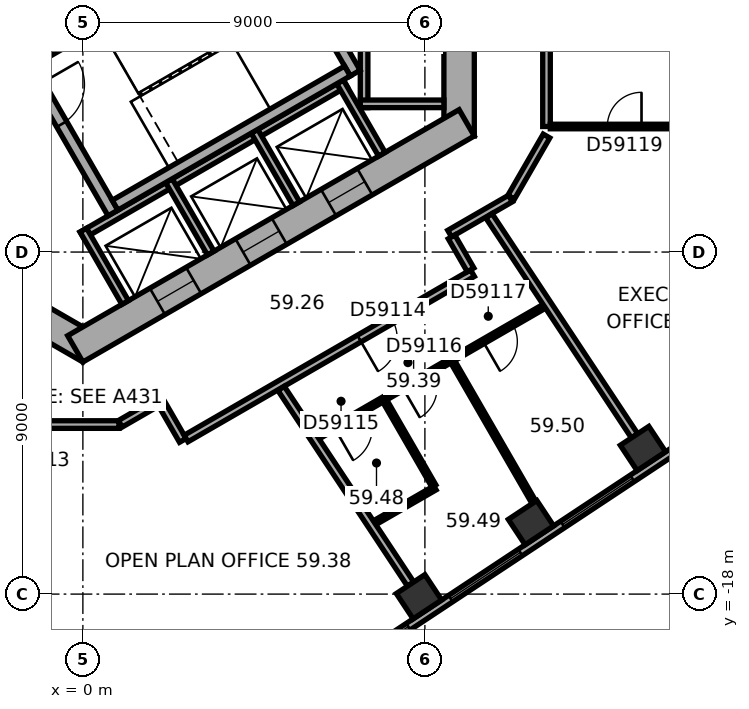
"""IFC4 building model, lengths in metres.
Left out: names, types, materials, properties, quantities, classifications, styles, units other than length and angle.
Written with IfcOpenShell. Run it as: python <this file> out.ifc"""

import sys

from ifc_helpers import new_model, si_unit, direction, frame, frame_2d, origin, origin_2d, place, context, subcontext, project, spatial, rectangle, extrude, element, fill, save


model = new_model("IFC4")
c1 = context("Model", 3, precision=1e-05, world=origin(), true_north=direction((0.0, 1.0)))
c2 = subcontext(c1, "Body", "Model", "MODEL_VIEW")
j1 = project(units=[si_unit("LENGTHUNIT", "METRE"), si_unit("PLANEANGLEUNIT", "RADIAN")], contexts=[c1])
p1 = place(None, origin())
s1 = spatial("IfcSite", under=j1, at=p1, CompositionType="ELEMENT")
p2 = place(p1, origin())
s2 = spatial("IfcBuilding", under=s1, at=p2, CompositionType="ELEMENT")
p3 = place(p2, frame((0.0, 0.0, 240.2)))
s3 = spatial("IfcBuildingStorey", under=s2, at=p3, CompositionType="ELEMENT", Elevation=240.2)
for number, where, z_axis, x_axis in (
    (1, (8.844, -18.07, 0.0), (0.0, 0.0, 1.0), (0.834, 0.552, 0.0)),
    (2, (11.791, -16.12, 0.0), (0.0, 0.0, 1.0), (0.834, 0.552, 0.0)),
    (3, (14.738, -14.169, 0.0), (0.0, 0.0, 1.0), (0.834, 0.552, 0.0)),
):
    element("IfcColumn", number, at=place(p3, frame(where, z_axis=z_axis, x_axis=x_axis)), inside=s3, PredefinedType="COLUMN", context=c2, shape_type="SweptSolid", body=[
        extrude(rectangle(XDim=0.9, YDim=0.8, at=origin_2d()), origin(), (0.0, 0.0, 1.0), 3.7),
    ])
p4 = place(p3, frame((9.9, -5.947, 0.0), z_axis=(0.0, 0.0, 1.0), x_axis=(0.0, 1.0, 0.0)))
e4 = element("IfcWall", 4, at=p4, inside=s3, PredefinedType="SHEAR", context=c2, shape_type="SweptSolid", body=[
    extrude(rectangle(XDim=11.894, YDim=0.8, at=frame_2d((5.947, 0.0))), origin(), (0.0, 0.0, 1.0), 3.7),
])
p5 = place(p4, frame((6.147, 0.0, 0.0)))
e5 = element("IfcOpeningElement", 5, at=p5, cuts=e4, PredefinedType="OPENING", context=c2, shape_type="SweptSolid", body=[
    extrude(rectangle(XDim=1.5, YDim=2.1, at=frame_2d((0.75, 1.05))), frame((0.0, 0.41, 0.0), z_axis=(0.0, -1.0, 0.0), x_axis=(1.0, 0.0, 0.0)), (0.0, 0.0, 1.0), 0.82),
])
p6 = place(p4, frame((2.997, 0.0, 0.0)))
e6 = element("IfcOpeningElement", 6, at=p6, cuts=e4, PredefinedType="OPENING", context=c2, shape_type="SweptSolid", body=[
    extrude(rectangle(XDim=0.9, YDim=2.1, at=frame_2d((0.45, 1.05))), frame((0.0, 0.41, 0.0), z_axis=(0.0, -1.0, 0.0), x_axis=(1.0, 0.0, 0.0)), (0.0, 0.0, 1.0), 0.82),
])
p7 = place(p3, frame((-10.1, -5.6, 0.0), z_axis=(0.0, 0.0, 1.0), x_axis=(0.866023897231, -0.500002609418, 0.0)))
e7 = element("IfcWall", 7, at=p7, inside=s3, PredefinedType="SHEAR", context=c2, shape_type="SweptSolid", body=[
    extrude(rectangle(XDim=11.894, YDim=0.8, at=frame_2d((5.947, 0.0))), origin(), (0.0, 0.0, 1.0), 3.7),
])
p8 = place(p7, frame((6.147, 0.0, 0.0)))
e8 = element("IfcOpeningElement", 8, at=p8, cuts=e7, PredefinedType="OPENING", context=c2, shape_type="SweptSolid", body=[
    extrude(rectangle(XDim=1.5, YDim=2.1, at=frame_2d((0.75, 1.05))), frame((0.0, 0.41, 0.0), z_axis=(0.0, -1.0, 0.0), x_axis=(1.0, 0.0, 0.0)), (0.0, 0.0, 1.0), 0.82),
])
p9 = place(p7, frame((1.597, 0.0, 0.0)))
e9 = element("IfcOpeningElement", 9, at=p9, cuts=e7, PredefinedType="OPENING", context=c2, shape_type="SweptSolid", body=[
    extrude(rectangle(XDim=1.1, YDim=2.1, at=frame_2d((0.55, 1.05))), frame((0.0, 0.41, 0.0), z_axis=(0.0, -1.0, 0.0), x_axis=(1.0, 0.0, 0.0)), (0.0, 0.0, 1.0), 0.82),
])
p10 = place(p7, frame((4.197, 0.0, 0.0)))
e10 = element("IfcOpeningElement", 10, at=p10, cuts=e7, PredefinedType="OPENING", context=c2, shape_type="SweptSolid", body=[
    extrude(rectangle(XDim=1.1, YDim=2.1, at=frame_2d((0.55, 1.05))), frame((0.0, 0.41, 0.0), z_axis=(0.0, -1.0, 0.0), x_axis=(1.0, 0.0, 0.0)), (0.0, 0.0, 1.0), 0.82),
])
p11 = place(p3, frame((-0.2, -11.547, 0.0), z_axis=(0.0, 0.0, 1.0), x_axis=(0.866023897231, 0.500002609418, 0.0)))
e11 = element("IfcWall", 11, at=p11, inside=s3, PredefinedType="SHEAR", context=c2, shape_type="SweptSolid", body=[
    extrude(rectangle(XDim=11.894, YDim=0.8, at=frame_2d((5.947, 0.0))), origin(), (0.0, 0.0, 1.0), 3.7),
])
p12 = place(p11, frame((2.497, 0.0, 0.0)))
e12 = element("IfcOpeningElement", 12, at=p12, cuts=e11, PredefinedType="OPENING", context=c2, shape_type="SweptSolid", body=[
    extrude(rectangle(XDim=1.1, YDim=2.1, at=frame_2d((0.55, 1.05))), frame((0.0, 0.41, 0.0), z_axis=(0.0, -1.0, 0.0), x_axis=(1.0, 0.0, 0.0)), (0.0, 0.0, 1.0), 0.82),
])
p13 = place(p11, frame((5.097, 0.0, 0.0)))
e13 = element("IfcOpeningElement", 13, at=p13, cuts=e11, PredefinedType="OPENING", context=c2, shape_type="SweptSolid", body=[
    extrude(rectangle(XDim=1.1, YDim=2.1, at=frame_2d((0.55, 1.05))), frame((0.0, 0.41, 0.0), z_axis=(0.0, -1.0, 0.0), x_axis=(1.0, 0.0, 0.0)), (0.0, 0.0, 1.0), 0.82),
])
p14 = place(p11, frame((7.697, 0.0, 0.0)))
e14 = element("IfcOpeningElement", 14, at=p14, cuts=e11, PredefinedType="OPENING", context=c2, shape_type="SweptSolid", body=[
    extrude(rectangle(XDim=1.1, YDim=2.1, at=frame_2d((0.55, 1.05))), frame((0.0, 0.41, 0.0), z_axis=(0.0, -1.0, 0.0), x_axis=(1.0, 0.0, 0.0)), (0.0, 0.0, 1.0), 0.82),
])
p15 = place(p3, frame((2.739, -22.711, 0.0), z_axis=(0.0, 0.0, 1.0), x_axis=(0.833885723098, 0.551937134838, 0.0)))
e15 = element("IfcWall", 15, at=p15, inside=s3, PredefinedType="STANDARD", context=c2, shape_type="SweptSolid", body=[
    extrude(rectangle(XDim=18.841, YDim=0.2, at=frame_2d((9.421, 0.0))), origin(), (0.0, 0.0, 1.0), 3.7),
])
p16 = place(p15, frame((1.252, 0.0, 0.9)))
e16 = element("IfcOpeningElement", 16, at=p16, cuts=e15, PredefinedType="OPENING", context=c2, shape_type="SweptSolid", body=[
    extrude(rectangle(XDim=2.2, YDim=2.0, at=frame_2d((1.1, 1.0))), frame((0.0, 0.11, 0.0), z_axis=(0.0, -1.0, 0.0), x_axis=(1.0, 0.0, 0.0)), (0.0, 0.0, 1.0), 0.22),
])
p17 = place(p15, frame((4.786, 0.0, 0.9)))
e17 = element("IfcOpeningElement", 17, at=p17, cuts=e15, PredefinedType="OPENING", context=c2, shape_type="SweptSolid", body=[
    extrude(rectangle(XDim=2.2, YDim=2.0, at=frame_2d((1.1, 1.0))), frame((0.0, 0.11, 0.0), z_axis=(0.0, -1.0, 0.0), x_axis=(1.0, 0.0, 0.0)), (0.0, 0.0, 1.0), 0.22),
])
p18 = place(p15, frame((8.32, 0.0, 0.9)))
e18 = element("IfcOpeningElement", 18, at=p18, cuts=e15, PredefinedType="OPENING", context=c2, shape_type="SweptSolid", body=[
    extrude(rectangle(XDim=2.2, YDim=2.0, at=frame_2d((1.1, 1.0))), frame((0.0, 0.11, 0.0), z_axis=(0.0, -1.0, 0.0), x_axis=(1.0, 0.0, 0.0)), (0.0, 0.0, 1.0), 0.22),
])
p19 = place(p15, frame((11.854, 0.0, 0.9)))
e19 = element("IfcOpeningElement", 19, at=p19, cuts=e15, PredefinedType="OPENING", context=c2, shape_type="SweptSolid", body=[
    extrude(rectangle(XDim=2.2, YDim=2.0, at=frame_2d((1.1, 1.0))), frame((0.0, 0.11, 0.0), z_axis=(0.0, -1.0, 0.0), x_axis=(1.0, 0.0, 0.0)), (0.0, 0.0, 1.0), 0.22),
])
p20 = place(p15, frame((15.387, 0.0, 0.9)))
e20 = element("IfcOpeningElement", 20, at=p20, cuts=e15, PredefinedType="OPENING", context=c2, shape_type="SweptSolid", body=[
    extrude(rectangle(XDim=2.2, YDim=2.0, at=frame_2d((1.1, 1.0))), frame((0.0, 0.11, 0.0), z_axis=(0.0, -1.0, 0.0), x_axis=(1.0, 0.0, 0.0)), (0.0, 0.0, 1.0), 0.22),
])
p21 = place(p3, frame((7.4, -5.2, 0.0), z_axis=(0.0, 0.0, 1.0), x_axis=(0.0, 1.0, 0.0)))
e21 = element("IfcWall", 21, at=p21, inside=s3, PredefinedType="PARTITIONING", context=c2, shape_type="SweptSolid", body=[
    extrude(rectangle(XDim=5.4, YDim=0.2, at=frame_2d((2.7, 0.0))), origin(), (0.0, 0.0, 1.0), 3.42),
])
p22 = place(p3, frame((7.3, -5.1, 0.0), z_axis=(0.0, 0.0, 1.0), x_axis=(1.0, 0.0, 0.0)))
e22 = element("IfcWall", 22, at=p22, inside=s3, PredefinedType="PARTITIONING", context=c2, shape_type="SweptSolid", body=[
    extrude(rectangle(XDim=2.2, YDim=0.2, at=frame_2d((1.1, 0.0))), origin(), (0.0, 0.0, 1.0), 3.42),
])
p23 = place(p3, frame((-0.024, -8.559, 0.0), z_axis=(0.0, 0.0, 1.0), x_axis=(0.866026010844, 0.49999894854, 0.0)))
e23 = element("IfcWall", 23, at=p23, inside=s3, PredefinedType="PARTITIONING", context=c2, shape_type="SweptSolid", body=[
    extrude(rectangle(XDim=8.0, YDim=0.2, at=frame_2d((4.0, 0.0))), origin(), (0.0, 0.0, 1.0), 3.42),
])
for number, where, z_axis, x_axis in (
    (24, (0.013, -8.422, 0.0), (0.0, 0.0, 1.0), (0.5, -0.866, 0.0)),
    (25, (2.264, -7.122, 0.0), (0.0, 0.0, 1.0), (0.5, -0.866, 0.0)),
    (26, (4.516, -5.822, 0.0), (0.0, 0.0, 1.0), (0.5, -0.866, 0.0)),
    (27, (6.768, -4.522, 0.0), (0.0, 0.0, 1.0), (0.5, -0.866, 0.0)),
):
    element("IfcWall", number, at=place(p3, frame(where, z_axis=z_axis, x_axis=x_axis)), inside=s3, PredefinedType="PARTITIONING", context=c2, shape_type="SweptSolid", body=[
        extrude(rectangle(XDim=2.2, YDim=0.2, at=frame_2d((1.1, 0.0))), origin(), (0.0, 0.0, 1.0), 3.42),
    ])
p24 = place(p3, frame((-1.558, -3.902, 0.0), z_axis=(0.0, 0.0, 1.0), x_axis=(0.499977259774, -0.866038532462, 0.0)))
e28 = element("IfcWall", 28, at=p24, inside=s3, PredefinedType="SHEAR", context=c2, shape_type="SweptSolid", body=[
    extrude(rectangle(XDim=4.7, YDim=0.3, at=frame_2d((2.35, 0.0))), origin(), (0.0, 0.0, 1.0), 3.42),
])
p25 = place(p24, frame((0.8, 0.0, 0.0)))
e29 = element("IfcOpeningElement", 29, at=p25, cuts=e28, PredefinedType="OPENING", context=c2, shape_type="SweptSolid", body=[
    extrude(rectangle(XDim=1.2, YDim=2.1, at=frame_2d((0.6, 1.05))), frame((0.0, 0.16, 0.0), z_axis=(0.0, -1.0, 0.0), x_axis=(1.0, 0.0, 0.0)), (0.0, 0.0, 1.0), 0.32),
])
p26 = place(p3, frame((4.816, -0.222, 0.0), z_axis=(0.0, 0.0, 1.0), x_axis=(0.499977259774, -0.866038532462, 0.0)))
e30 = element("IfcWall", 30, at=p26, inside=s3, PredefinedType="SHEAR", context=c2, shape_type="SweptSolid", body=[
    extrude(rectangle(XDim=4.7, YDim=0.3, at=frame_2d((2.35, 0.0))), origin(), (0.0, 0.0, 1.0), 3.42),
])
for number, where, z_axis, x_axis in (
    (31, (-1.353, -3.957, 0.0), (0.0, 0.0, 1.0), (0.866, 0.5, 0.0)),
    (32, (0.847, -7.767, 0.0), (0.0, 0.0, 1.0), (0.866, 0.5, 0.0)),
):
    element("IfcWall", number, at=place(p3, frame(where, z_axis=z_axis, x_axis=x_axis)), inside=s3, PredefinedType="SHEAR", context=c2, shape_type="SweptSolid", body=[
        extrude(rectangle(XDim=7.06, YDim=0.3, at=frame_2d((3.53, 0.0))), origin(), (0.0, 0.0, 1.0), 3.42),
    ])
p27 = place(p3, frame((-0.91, -13.539, 0.0), z_axis=(0.0, 0.0, 1.0), x_axis=(1.0, 0.0, 0.0)))
e33 = element("IfcWall", 33, at=p27, inside=s3, PredefinedType="PARTITIONING", context=c2, shape_type="SweptSolid", body=[
    extrude(rectangle(XDim=1.86, YDim=0.2, at=frame_2d((0.93, 0.0))), origin(), (0.0, 0.0, 1.0), 3.42),
])
p28 = place(p3, frame((0.985, -13.519, 0.0), z_axis=(0.0, 0.0, 1.0), x_axis=(0.866054082991, 0.499950322867, 0.0)))
e34 = element("IfcWall", 34, at=p28, inside=s3, PredefinedType="PARTITIONING", context=c2, shape_type="SweptSolid", body=[
    extrude(rectangle(XDim=1.206, YDim=0.2, at=frame_2d((0.603, 0.0))), origin(), (0.0, 0.0, 1.0), 3.42),
])
p29 = place(p3, frame((2.079, -13.003, 0.0), z_axis=(0.0, 0.0, 1.0), x_axis=(0.500074377092, -0.865982457891, 0.0)))
e35 = element("IfcWall", 35, at=p29, inside=s3, PredefinedType="PARTITIONING", context=c2, shape_type="SweptSolid", body=[
    extrude(rectangle(XDim=1.101, YDim=0.2, at=frame_2d((0.55, 0.0))), origin(), (0.0, 0.0, 1.0), 3.42),
])
p30 = place(p3, frame((2.716, -13.906, 0.0), z_axis=(0.0, 0.0, 1.0), x_axis=(0.866040290674, 0.499974214264, 0.0)))
e36 = element("IfcWall", 36, at=p30, inside=s3, PredefinedType="PARTITIONING", context=c2, shape_type="SweptSolid", body=[
    extrude(rectangle(XDim=8.702, YDim=0.2, at=frame_2d((4.351, 0.0))), origin(), (0.0, 0.0, 1.0), 3.42),
])
p31 = place(p30, frame((5.26, 0.0, 0.0)))
e37 = element("IfcOpeningElement", 37, at=p31, cuts=e36, PredefinedType="OPENING", context=c2, shape_type="SweptSolid", body=[
    extrude(rectangle(XDim=1.0, YDim=2.1, at=frame_2d((0.5, 1.05))), frame((0.0, 0.11, 0.0), z_axis=(0.0, -1.0, 0.0), x_axis=(1.0, 0.0, 0.0)), (0.0, 0.0, 1.0), 0.22),
])
p32 = place(p3, frame((6.183, -13.867, 0.0), z_axis=(0.0, 0.0, 1.0), x_axis=(0.866031365477, 0.499989673903, 0.0)))
e38 = element("IfcWall", 38, at=p32, inside=s3, PredefinedType="PARTITIONING", context=c2, shape_type="SweptSolid", body=[
    extrude(rectangle(XDim=6.881, YDim=0.12, at=frame_2d((3.44, 0.0))), origin(), (0.0, 0.0, 1.0), 3.42),
])
p33 = place(p32, frame((0.5, 0.0, 0.0)))
e39 = element("IfcOpeningElement", 39, at=p33, cuts=e38, PredefinedType="OPENING", context=c2, shape_type="SweptSolid", body=[
    extrude(rectangle(XDim=1.0, YDim=2.1, at=frame_2d((0.5, 1.05))), frame((0.0, 0.07, 0.0), z_axis=(0.0, -1.0, 0.0), x_axis=(1.0, 0.0, 0.0)), (0.0, 0.0, 1.0), 0.14),
])
p34 = place(p32, frame((2.583, 0.0, 0.0)))
e40 = element("IfcOpeningElement", 40, at=p34, cuts=e38, PredefinedType="OPENING", context=c2, shape_type="SweptSolid", body=[
    extrude(rectangle(XDim=0.9, YDim=2.1, at=frame_2d((0.45, 1.05))), frame((0.0, 0.07, 0.0), z_axis=(0.0, -1.0, 0.0), x_axis=(1.0, 0.0, 0.0)), (0.0, 0.0, 1.0), 0.14),
])
p35 = place(p32, frame((5.023, 0.0, 0.0)))
e41 = element("IfcOpeningElement", 41, at=p35, cuts=e38, PredefinedType="OPENING", context=c2, shape_type="SweptSolid", body=[
    extrude(rectangle(XDim=0.9, YDim=2.1, at=frame_2d((0.45, 1.05))), frame((0.0, 0.07, 0.0), z_axis=(0.0, -1.0, 0.0), x_axis=(1.0, 0.0, 0.0)), (0.0, 0.0, 1.0), 0.14),
])
p36 = place(p3, frame((7.676, -16.123, 0.0), z_axis=(0.0, 0.0, 1.0), x_axis=(0.866023842607, 0.500002704028, 0.0)))
e42 = element("IfcWall", 42, at=p36, inside=s3, PredefinedType="PARTITIONING", context=c2, shape_type="SweptSolid", body=[
    extrude(rectangle(XDim=1.835, YDim=0.12, at=frame_2d((0.917, 0.0))), origin(), (0.0, 0.0, 1.0), 3.42),
])
p37 = place(p3, frame((8.624, -17.737, 0.0), z_axis=(0.0, 0.0, 1.0), x_axis=(-0.55193161762, 0.83388937484, 0.0)))
e43 = element("IfcWall", 43, at=p37, inside=s3, PredefinedType="PARTITIONING", context=c2, shape_type="SweptSolid", body=[
    extrude(rectangle(XDim=6.173, YDim=0.2, at=frame_2d((3.086, 0.0))), origin(), (0.0, 0.0, 1.0), 2.87),
])
p38 = place(p3, frame((9.235, -15.154, 0.0), z_axis=(0.0, 0.0, 1.0), x_axis=(-0.500006411147, 0.866021702275, 0.0)))
e44 = element("IfcWall", 44, at=p38, inside=s3, PredefinedType="PARTITIONING", context=c2, shape_type="SweptSolid", body=[
    extrude(rectangle(XDim=2.58, YDim=0.12, at=frame_2d((1.29, 0.0))), origin(), (0.0, 0.0, 1.0), 3.42),
])
p39 = place(p3, frame((9.652, -8.515, 0.0), z_axis=(0.0, 0.0, 1.0), x_axis=(0.866020375458, 0.500008709215, 0.0)))
e45 = element("IfcWall", 45, at=p39, inside=s3, PredefinedType="PARTITIONING", context=c2, shape_type="SweptSolid", body=[
    extrude(rectangle(XDim=1.846, YDim=0.2, at=frame_2d((0.923, 0.0))), origin(), (0.0, 0.0, 1.0), 3.42),
])
p40 = place(p3, frame((10.202, -9.469, 0.0), z_axis=(0.0, 0.0, 1.0), x_axis=(-0.499968756647, 0.866043441391, 0.0)))
e46 = element("IfcWall", 46, at=p40, inside=s3, PredefinedType="PARTITIONING", context=c2, shape_type="SweptSolid", body=[
    extrude(rectangle(XDim=1.001, YDim=0.2, at=frame_2d((0.5, 0.0))), origin(), (0.0, 0.0, 1.0), 3.42),
])
p41 = place(p3, frame((11.27, -7.558, 0.0), z_axis=(0.0, 0.0, 1.0), x_axis=(0.499964847546, 0.866045698112, 0.0)))
e47 = element("IfcWall", 47, at=p41, inside=s3, PredefinedType="PARTITIONING", context=c2, shape_type="SweptSolid", body=[
    extrude(rectangle(XDim=1.86, YDim=0.2, at=frame_2d((0.93, 0.0))), origin(), (0.0, 0.0, 1.0), 3.42),
])
p42 = place(p3, frame((11.87, -15.588, 0.0), z_axis=(0.0, 0.0, 1.0), x_axis=(-0.49999774064, 0.866026708223, 0.0)))
e48 = element("IfcWall", 48, at=p42, inside=s3, PredefinedType="PARTITIONING", context=c2, shape_type="SweptSolid", body=[
    extrude(rectangle(XDim=4.273, YDim=0.12, at=frame_2d((2.137, 0.0))), origin(), (0.0, 0.0, 1.0), 3.42),
])
p43 = place(p3, frame((12.2, -5.697, 0.0), z_axis=(0.0, 0.0, 1.0), x_axis=(0.0, 1.0, 0.0)))
e49 = element("IfcWall", 49, at=p43, inside=s3, PredefinedType="PARTITIONING", context=c2, shape_type="SweptSolid", body=[
    extrude(rectangle(XDim=4.761, YDim=0.2, at=frame_2d((2.381, 0.0))), origin(), (0.0, 0.0, 1.0), 3.42),
])
p44 = place(p3, frame((14.517, -13.836, 0.0), z_axis=(0.0, 0.0, 1.0), x_axis=(-0.551938455794, 0.833884848775, 0.0)))
e50 = element("IfcWall", 50, at=p44, inside=s3, PredefinedType="PARTITIONING", context=c2, shape_type="SweptSolid", body=[
    extrude(rectangle(XDim=6.944, YDim=0.2, at=frame_2d((3.472, 0.0))), origin(), (0.0, 0.0, 1.0), 2.87),
])
p45 = place(p3, frame((16.2, -5.697, 0.0), z_axis=(0.0, 0.0, 1.0), x_axis=(-1.0, 0.0, 0.0)))
e51 = element("IfcWall", 51, at=p45, inside=s3, PredefinedType="PARTITIONING", context=c2, shape_type="SweptSolid", body=[
    extrude(rectangle(XDim=3.9, YDim=0.12, at=frame_2d((1.95, 0.0))), origin(), (0.0, 0.0, 1.0), 3.42),
])
p46 = place(p45, frame((1.5, 0.0, 0.0)))
e52 = element("IfcOpeningElement", 52, at=p46, cuts=e51, PredefinedType="OPENING", context=c2, shape_type="SweptSolid", body=[
    extrude(rectangle(XDim=0.9, YDim=2.1, at=frame_2d((0.45, 1.05))), frame((0.0, 0.07, 0.0), z_axis=(0.0, -1.0, 0.0), x_axis=(1.0, 0.0, 0.0)), (0.0, 0.0, 1.0), 0.14),
])
p47 = place(p17, origin())
e53 = element("IfcWindow", 53, at=p47, inside=s3, PartitioningType="SINGLE_PANEL", PredefinedType="WINDOW", context=c2, shape_type="SweptSolid", body=[
    extrude(rectangle(XDim=2.2, YDim=2.0, at=frame_2d((1.1, 1.0))), frame((0.0, 0.03, 0.0), z_axis=(0.0, -1.0, 0.0), x_axis=(1.0, 0.0, 0.0)), (0.0, 0.0, 1.0), 0.06),
])
fill(e17, e53)
p48 = place(p18, origin())
e54 = element("IfcWindow", 54, at=p48, inside=s3, PartitioningType="SINGLE_PANEL", PredefinedType="WINDOW", context=c2, shape_type="SweptSolid", body=[
    extrude(rectangle(XDim=2.2, YDim=2.0, at=frame_2d((1.1, 1.0))), frame((0.0, 0.03, 0.0), z_axis=(0.0, -1.0, 0.0), x_axis=(1.0, 0.0, 0.0)), (0.0, 0.0, 1.0), 0.06),
])
fill(e18, e54)
p49 = place(p19, origin())
e55 = element("IfcWindow", 55, at=p49, inside=s3, PartitioningType="SINGLE_PANEL", PredefinedType="WINDOW", context=c2, shape_type="SweptSolid", body=[
    extrude(rectangle(XDim=2.2, YDim=2.0, at=frame_2d((1.1, 1.0))), frame((0.0, 0.03, 0.0), z_axis=(0.0, -1.0, 0.0), x_axis=(1.0, 0.0, 0.0)), (0.0, 0.0, 1.0), 0.06),
])
fill(e19, e55)
p50 = place(p25, origin())
e56 = element("IfcDoor", 56, at=p50, inside=s3, OperationType="SINGLE_SWING_RIGHT", PredefinedType="DOOR", context=c2, shape_type="SweptSolid", body=[
    extrude(rectangle(XDim=1.2, YDim=2.1, at=frame_2d((0.6, 1.05))), frame((0.0, 0.025, 0.0), z_axis=(0.0, -1.0, 0.0), x_axis=(1.0, 0.0, 0.0)), (0.0, 0.0, 1.0), 0.05),
])
fill(e29, e56)
p51 = place(p12, origin())
e57 = element("IfcDoor", 57, at=p51, inside=s3, OperationType="DOUBLE_DOOR_SLIDING", PredefinedType="DOOR", context=c2, shape_type="SweptSolid", body=[
    extrude(rectangle(XDim=1.1, YDim=2.1, at=frame_2d((0.55, 1.05))), frame((0.0, 0.025, 0.0), z_axis=(0.0, -1.0, 0.0), x_axis=(1.0, 0.0, 0.0)), (0.0, 0.0, 1.0), 0.05),
])
fill(e12, e57)
p52 = place(p13, origin())
e58 = element("IfcDoor", 58, at=p52, inside=s3, OperationType="DOUBLE_DOOR_SLIDING", PredefinedType="DOOR", context=c2, shape_type="SweptSolid", body=[
    extrude(rectangle(XDim=1.1, YDim=2.1, at=frame_2d((0.55, 1.05))), frame((0.0, 0.025, 0.0), z_axis=(0.0, -1.0, 0.0), x_axis=(1.0, 0.0, 0.0)), (0.0, 0.0, 1.0), 0.05),
])
fill(e13, e58)
p53 = place(p14, origin())
e59 = element("IfcDoor", 59, at=p53, inside=s3, OperationType="DOUBLE_DOOR_SLIDING", PredefinedType="DOOR", context=c2, shape_type="SweptSolid", body=[
    extrude(rectangle(XDim=1.1, YDim=2.1, at=frame_2d((0.55, 1.05))), frame((0.0, 0.025, 0.0), z_axis=(0.0, -1.0, 0.0), x_axis=(1.0, 0.0, 0.0)), (0.0, 0.0, 1.0), 0.05),
])
fill(e14, e59)
p54 = place(p31, origin())
e60 = element("IfcDoor", 60, at=p54, inside=s3, OperationType="SINGLE_SWING_LEFT", PredefinedType="DOOR", context=c2, shape_type="SweptSolid", body=[
    extrude(rectangle(XDim=1.0, YDim=2.1, at=frame_2d((0.5, 1.05))), frame((0.0, 0.025, 0.0), z_axis=(0.0, -1.0, 0.0), x_axis=(1.0, 0.0, 0.0)), (0.0, 0.0, 1.0), 0.05),
])
fill(e37, e60)
p55 = place(p33, origin())
e61 = element("IfcDoor", 61, at=p55, inside=s3, OperationType="SINGLE_SWING_LEFT", PredefinedType="DOOR", context=c2, shape_type="SweptSolid", body=[
    extrude(rectangle(XDim=1.0, YDim=2.1, at=frame_2d((0.5, 1.05))), frame((0.0, 0.025, 0.0), z_axis=(0.0, -1.0, 0.0), x_axis=(1.0, 0.0, 0.0)), (0.0, 0.0, 1.0), 0.05),
])
fill(e39, e61)
p56 = place(p34, origin())
e62 = element("IfcDoor", 62, at=p56, inside=s3, OperationType="SINGLE_SWING_LEFT", PredefinedType="DOOR", context=c2, shape_type="SweptSolid", body=[
    extrude(rectangle(XDim=0.9, YDim=2.1, at=frame_2d((0.45, 1.05))), frame((0.0, 0.025, 0.0), z_axis=(0.0, -1.0, 0.0), x_axis=(1.0, 0.0, 0.0)), (0.0, 0.0, 1.0), 0.05),
])
fill(e40, e62)
p57 = place(p35, origin())
e63 = element("IfcDoor", 63, at=p57, inside=s3, OperationType="SINGLE_SWING_LEFT", PredefinedType="DOOR", context=c2, shape_type="SweptSolid", body=[
    extrude(rectangle(XDim=0.9, YDim=2.1, at=frame_2d((0.45, 1.05))), frame((0.0, 0.025, 0.0), z_axis=(0.0, -1.0, 0.0), x_axis=(1.0, 0.0, 0.0)), (0.0, 0.0, 1.0), 0.05),
])
fill(e41, e63)
p58 = place(p46, origin())
e64 = element("IfcDoor", 64, at=p58, inside=s3, OperationType="SINGLE_SWING_LEFT", PredefinedType="DOOR", context=c2, shape_type="SweptSolid", body=[
    extrude(rectangle(XDim=0.9, YDim=2.1, at=frame_2d((0.45, 1.05))), frame((0.0, 0.025, 0.0), z_axis=(0.0, -1.0, 0.0), x_axis=(1.0, 0.0, 0.0)), (0.0, 0.0, 1.0), 0.05),
])
fill(e52, e64)
save(model, sys.argv[1])
